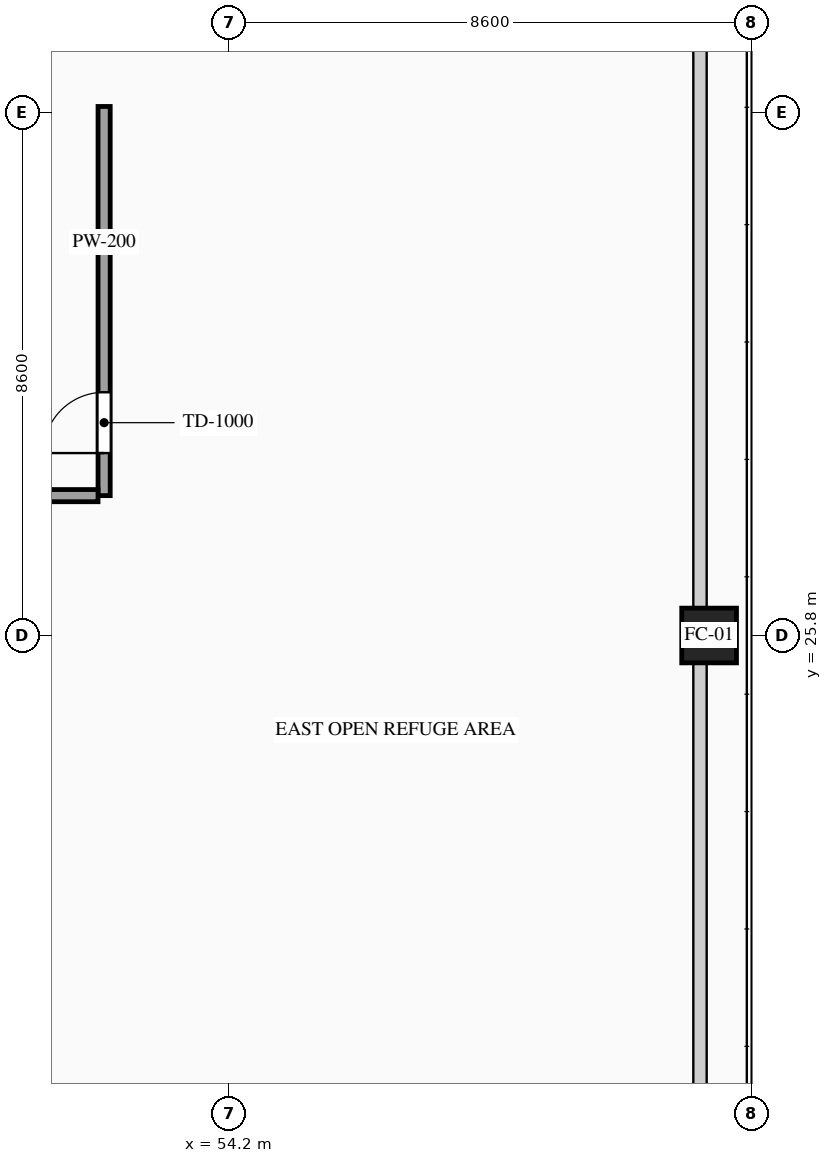
"""IFC4 building model, lengths in metres.
Left out: names, types, materials, properties, quantities, classifications, styles, units other than length and angle.
Written with IfcOpenShell. Run it as: python <this file> out.ifc"""

import sys

from ifc_helpers import new_model, si_unit, direction, frame, frame_2d, origin, origin_2d, place, context, subcontext, project, spatial, rectangle, hollow_rectangle, extrude, source, transform, mapped, element, fill, save


model = new_model("IFC4")
c1 = context("Model", 3, precision=1e-05, world=origin(), true_north=direction((0.0, 1.0)))
c2 = subcontext(c1, "Body", "Model", "MODEL_VIEW")
j1 = project(units=[si_unit("LENGTHUNIT", "METRE"), si_unit("PLANEANGLEUNIT", "RADIAN")], contexts=[c1])
p1 = place(None, origin())
s1 = spatial("IfcSite", under=j1, at=p1, CompositionType="ELEMENT")
p2 = place(p1, origin())
s2 = spatial("IfcBuilding", under=s1, at=p2, CompositionType="ELEMENT")
p3 = place(p2, frame((0.0, 0.0, 41.4)))
s3 = spatial("IfcBuildingStorey", under=s2, at=p3, CompositionType="ELEMENT", Elevation=41.4)
m1 = source(origin(), c2, "Body", "SweptSolid", [
    extrude(hollow_rectangle(XDim=0.9, YDim=0.9, WallThickness=0.042, at=origin_2d()), origin(), (0.0, 0.0, 1.0), 4.6),
])
p4 = place(p3, frame((62.1, 25.8, 0.0), z_axis=(0.0, 0.0, 1.0), x_axis=(1.0, 0.0, 0.0)))
e1 = element("IfcColumn", 1, at=p4, inside=s3, PredefinedType="COLUMN", context=c2, shape_type="MappedRepresentation", body=[
    mapped(m1, transform((0.0, 0.0, 0.0), scale=1.0)),
])
p5 = place(p3, frame((52.15, 28.1, 0.0), z_axis=(0.0, 0.0, 1.0), x_axis=(0.0, 1.0, 0.0)))
e2 = element("IfcWall", 2, at=p5, inside=s3, PredefinedType="PARTITIONING", context=c2, shape_type="SweptSolid", body=[
    extrude(rectangle(XDim=6.4, YDim=0.2, at=frame_2d((3.2, 0.0))), origin(), (0.0, 0.0, 1.0), 4.38),
])
p6 = place(p5, frame((0.7, 0.0, 0.0)))
e3 = element("IfcOpeningElement", 3, at=p6, cuts=e2, PredefinedType="OPENING", context=c2, shape_type="SweptSolid", body=[
    extrude(rectangle(XDim=1.0, YDim=2.2, at=frame_2d((0.5, 1.1))), frame((0.0, 0.115, 0.0), z_axis=(0.0, -1.0, 0.0), x_axis=(1.0, 0.0, 0.0)), (0.0, 0.0, 1.0), 0.23),
])
m2 = source(origin(), c2, "Body", "SweptSolid", [
    extrude(rectangle(XDim=1.38, YDim=0.2, at=frame_2d((0.69, 0.0))), origin(), (0.0, 0.0, 1.0), 4.38),
])
p7 = place(p3, frame((50.67, 28.1, 0.0), z_axis=(0.0, 0.0, 1.0), x_axis=(1.0, 0.0, 0.0)))
e4 = element("IfcWall", 4, at=p7, inside=s3, PredefinedType="PARTITIONING", context=c2, shape_type="MappedRepresentation", body=[
    mapped(m2, transform((0.0, 0.0, 0.0), scale=1.0)),
])
m3 = source(origin(), c2, "Body", "SweptSolid", [
    extrude(rectangle(XDim=1.0, YDim=2.2, at=frame_2d((0.5, 1.1))), frame((0.0, 0.025, 0.0), z_axis=(0.0, -1.0, 0.0), x_axis=(1.0, 0.0, 0.0)), (0.0, 0.0, 1.0), 0.05),
])
p8 = place(p6, origin())
e5 = element("IfcDoor", 5, at=p8, inside=s3, OperationType="SINGLE_SWING_LEFT", PredefinedType="DOOR", context=c2, shape_type="MappedRepresentation", body=[
    mapped(m3, transform((0.0, 0.0, 0.0), scale=1.0)),
])
fill(e3, e5)
save(model, sys.argv[1])
